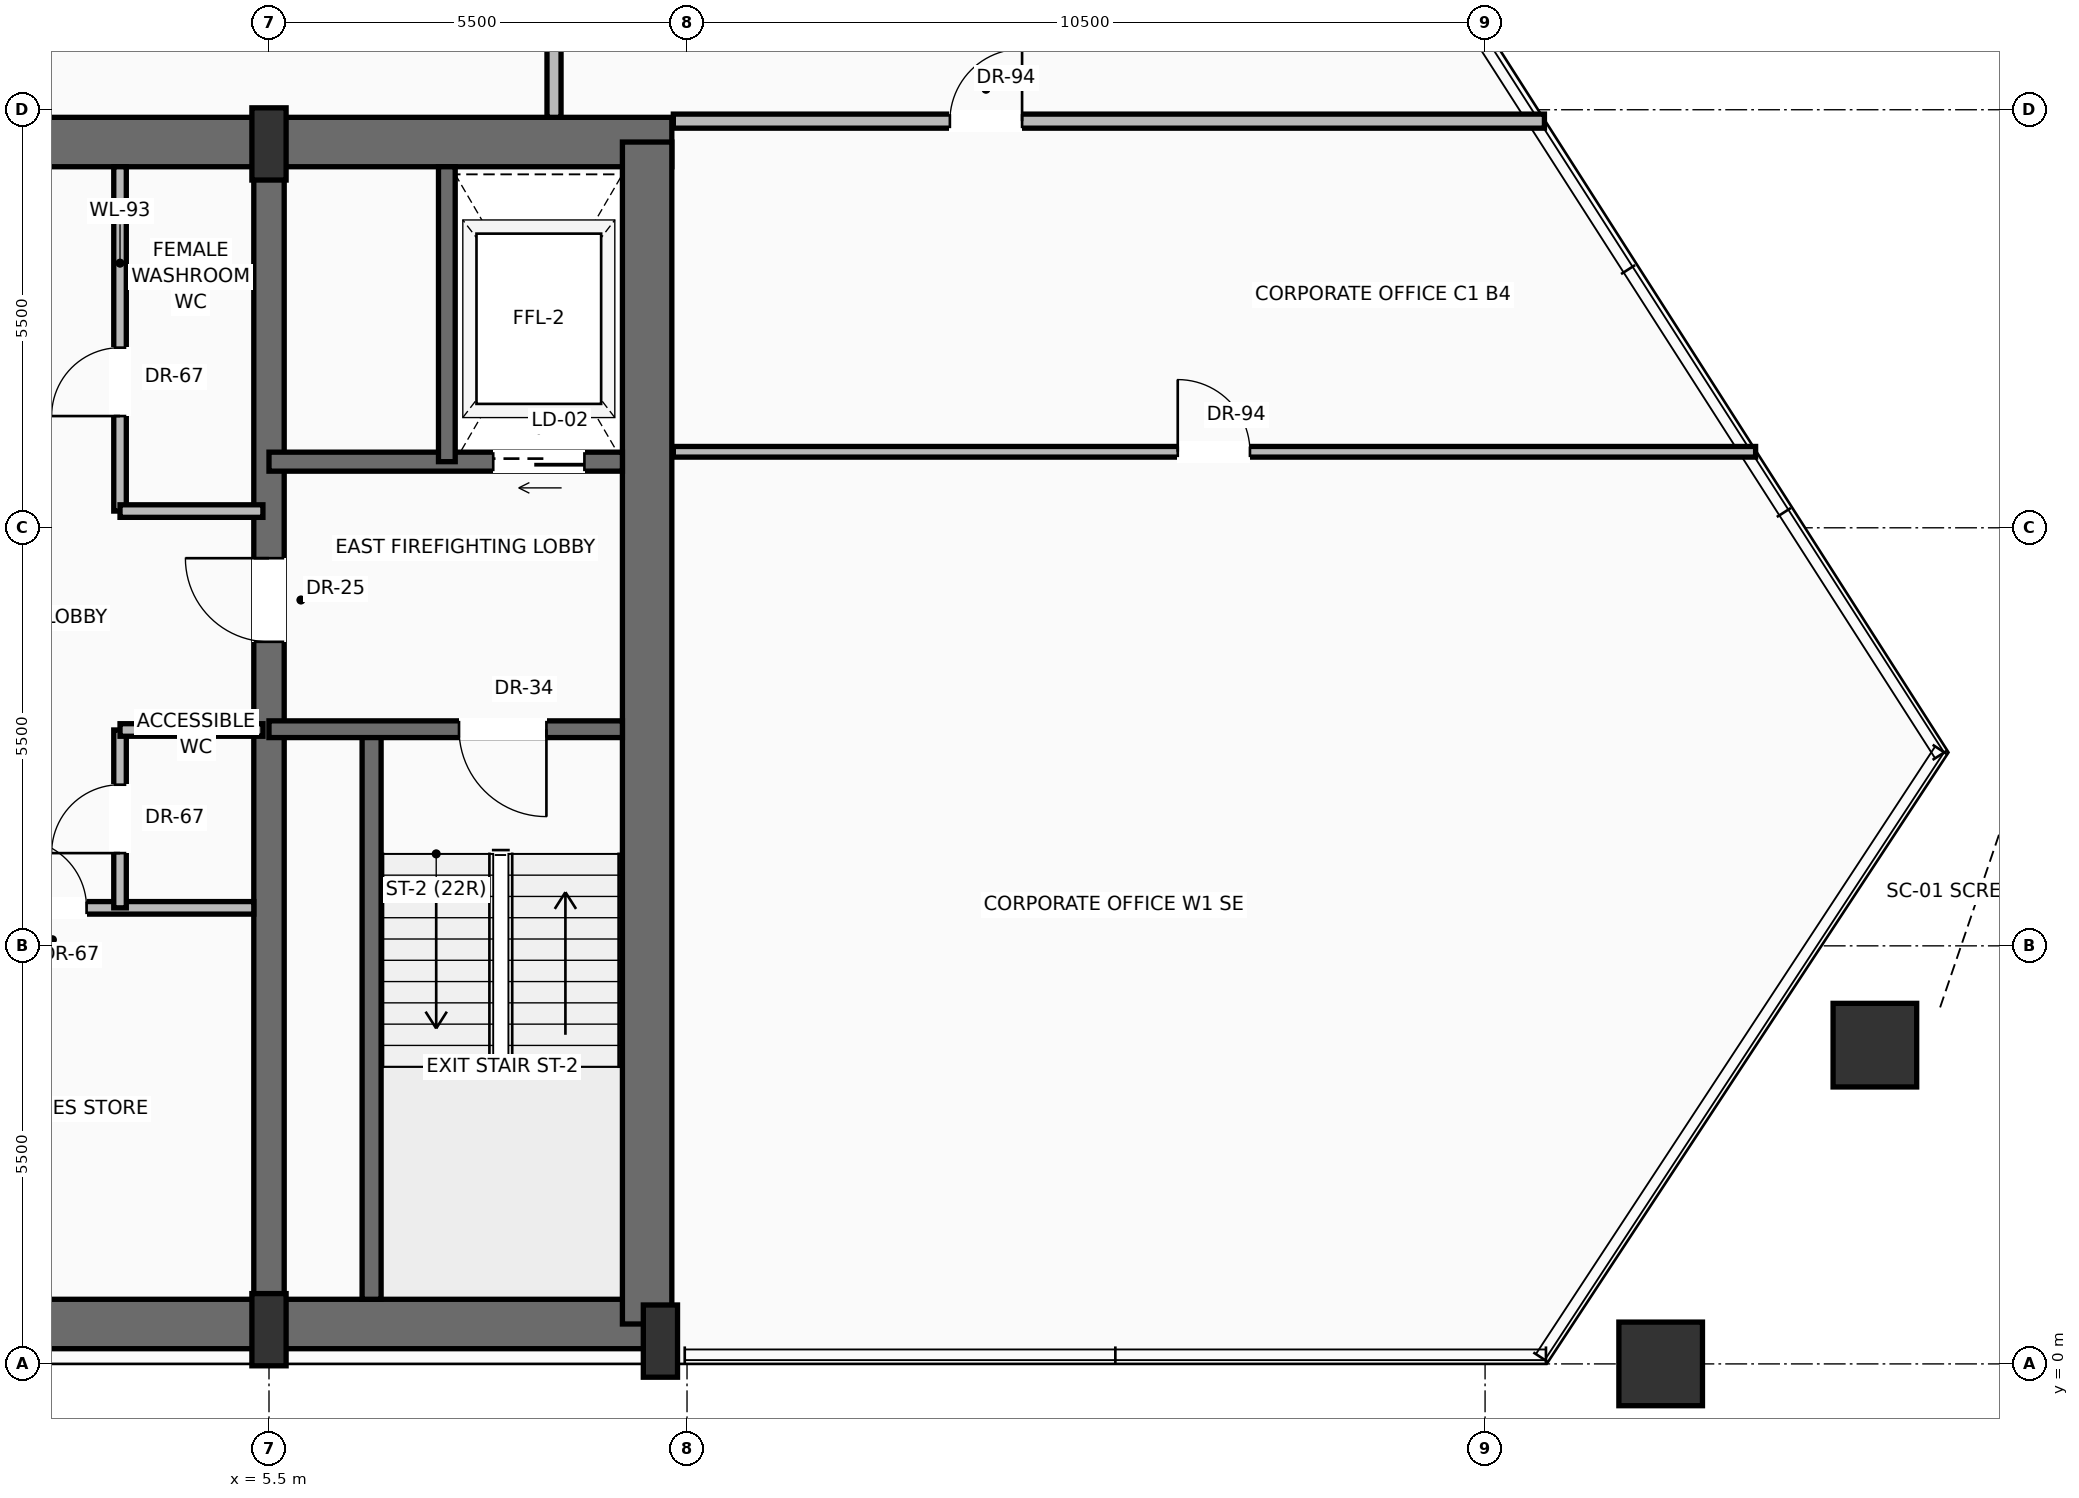
"""IFC4 building model, lengths in metres.
Left out: names, types, materials, properties, quantities, classifications, styles, units other than length and angle.
Written with IfcOpenShell. Run it as: python <this file> out.ifc"""

import sys

from ifc_helpers import new_model, si_unit, direction, frame, frame_2d, origin, origin_2d, place, context, subcontext, project, spatial, rectangle, hollow_rectangle, extrude, source, transform, mapped, element, fill, save


model = new_model("IFC4")
c1 = context("Model", 3, precision=1e-05, world=origin(), true_north=direction((0.0, 1.0)))
c2 = subcontext(c1, "Body", "Model", "MODEL_VIEW")
j1 = project(units=[si_unit("LENGTHUNIT", "METRE"), si_unit("PLANEANGLEUNIT", "RADIAN")], contexts=[c1])
p1 = place(None, origin())
s1 = spatial("IfcSite", under=j1, at=p1, CompositionType="ELEMENT")
p2 = place(p1, origin())
s2 = spatial("IfcBuilding", under=s1, at=p2, CompositionType="ELEMENT")
p3 = place(p2, frame((0.0, 0.0, 129.3)))
s3 = spatial("IfcBuildingStorey", under=s2, at=p3, CompositionType="ELEMENT", Elevation=129.3)
p4 = place(p3, frame((-10.65, 0.525, 0.0), z_axis=(0.0, 0.0, 1.0), x_axis=(1.0, 0.0, 0.0)))
e1 = element("IfcWall", 1, at=p4, inside=s3, PredefinedType="SHEAR", context=c2, shape_type="SweptSolid", body=[
    extrude(rectangle(XDim=21.3, YDim=0.65, at=frame_2d((10.65, 0.0))), origin(), (0.0, 0.0, 1.0), 3.47),
])
p5 = place(p3, frame((-10.8, 16.075, 0.0), z_axis=(0.0, 0.0, 1.0), x_axis=(1.0, 0.0, 0.0)))
e2 = element("IfcWall", 2, at=p5, inside=s3, PredefinedType="SHEAR", context=c2, shape_type="SweptSolid", body=[
    extrude(rectangle(XDim=21.6, YDim=0.65, at=frame_2d((10.8, 0.0))), origin(), (0.0, 0.0, 1.0), 3.47),
])
p6 = place(p5, frame((3.37, 0.0, 0.0)))
e3 = element("IfcOpeningElement", 3, at=p6, cuts=e2, PredefinedType="OPENING", context=c2, shape_type="SweptSolid", body=[
    extrude(rectangle(XDim=1.3, YDim=2.3, at=frame_2d((0.65, 1.15))), frame((0.0, 0.335, 0.0), z_axis=(0.0, -1.0, 0.0), x_axis=(1.0, 0.0, 0.0)), (0.0, 0.0, 1.0), 0.67),
])
p7 = place(p5, frame((9.8, 0.0, 0.0)))
e4 = element("IfcOpeningElement", 4, at=p7, cuts=e2, PredefinedType="OPENING", context=c2, shape_type="SweptSolid", body=[
    extrude(rectangle(XDim=2.0, YDim=2.4, at=frame_2d((1.0, 1.2))), frame((0.0, 0.335, 0.0), z_axis=(0.0, -1.0, 0.0), x_axis=(1.0, 0.0, 0.0)), (0.0, 0.0, 1.0), 0.67),
])
p8 = place(p3, frame((10.475, 0.525, 0.0), z_axis=(0.0, 0.0, 1.0), x_axis=(0.0, 1.0, 0.0)))
e5 = element("IfcWall", 5, at=p8, inside=s3, PredefinedType="SHEAR", context=c2, shape_type="SweptSolid", body=[
    extrude(rectangle(XDim=15.55, YDim=0.65, at=frame_2d((7.775, 0.0))), origin(), (0.0, 0.0, 1.0), 3.47),
])
p9 = place(p3, frame((5.5, 0.525, 0.0), z_axis=(0.0, 0.0, 1.0), x_axis=(0.0, 1.0, 0.0)))
e6 = element("IfcWall", 6, at=p9, inside=s3, PredefinedType="SHEAR", context=c2, shape_type="SweptSolid", body=[
    extrude(rectangle(XDim=15.55, YDim=0.4, at=frame_2d((7.775, 0.0))), origin(), (0.0, 0.0, 1.0), 3.47),
])
p10 = place(p9, frame((8.975, 0.0, 0.0)))
e7 = element("IfcOpeningElement", 7, at=p10, cuts=e6, PredefinedType="OPENING", context=c2, shape_type="SweptSolid", body=[
    extrude(rectangle(XDim=1.1, YDim=2.2, at=frame_2d((0.55, 1.1))), frame((0.0, 0.21, 0.0), z_axis=(0.0, -1.0, 0.0), x_axis=(1.0, 0.0, 0.0)), (0.0, 0.0, 1.0), 0.42),
])
m1 = source(origin(), c2, "Body", "SweptSolid", [
    extrude(rectangle(XDim=0.45, YDim=0.95, at=origin_2d()), origin(), (0.0, 0.0, 1.0), 3.7),
])
for number, where, z_axis, x_axis in (
    (8, (5.5, 0.45, 0.0), (0.0, 0.0, 1.0), (1.0, 0.0, 0.0)),
    (9, (10.65, 0.3, 0.0), (0.0, 0.0, 1.0), (1.0, 0.0, 0.0)),
    (10, (5.5, 16.05, 0.0), (0.0, 0.0, 1.0), (1.0, 0.0, 0.0)),
):
    element("IfcColumn", number, at=place(p3, frame(where, z_axis=z_axis, x_axis=x_axis)), inside=s3, PredefinedType="PILASTER", context=c2, shape_type="MappedRepresentation", body=[
        mapped(m1, transform((0.0, 0.0, 0.0), scale=1.0)),
    ])
m2 = source(origin(), c2, "Body", "SweptSolid", [
    extrude(hollow_rectangle(XDim=1.1, YDim=1.1, WallThickness=0.055, at=origin_2d()), origin(), (0.0, 0.0, 1.0), 3.691),
])
p11 = place(p3, frame((23.81, 0.0, 0.004), z_axis=(0.009590140351, 0.0, 0.999954013547), x_axis=(0.0, 1.0, 0.0)))
e11 = element("IfcColumn", 11, at=p11, inside=s3, PredefinedType="COLUMN", context=c2, shape_type="MappedRepresentation", body=[
    mapped(m2, transform((0.0, 0.0, 0.0), scale=1.0)),
])
m3 = source(origin(), c2, "Body", "SweptSolid", [
    extrude(hollow_rectangle(XDim=1.1, YDim=1.1, WallThickness=0.055, at=origin_2d()), origin(), (0.0, 0.0, 1.0), 3.692),
])
p12 = place(p3, frame((26.629, 4.194, 0.004), z_axis=(-0.003108283928, -0.015475285939, 0.999875419288), x_axis=(0.980419197518, -0.19692180463, 0.0)))
e12 = element("IfcColumn", 12, at=p12, inside=s3, PredefinedType="COLUMN", context=c2, shape_type="MappedRepresentation", body=[
    mapped(m3, transform((0.0, 0.0, 0.0), scale=1.0)),
])
p13 = place(p3, frame((6.85, 0.85, 0.0), z_axis=(0.0, 0.0, 1.0), x_axis=(0.0, 1.0, 0.0)))
e13 = element("IfcWall", 13, at=p13, inside=s3, PredefinedType="SOLIDWALL", context=c2, shape_type="SweptSolid", body=[
    extrude(rectangle(XDim=7.5, YDim=0.25, at=frame_2d((3.75, 0.0))), origin(), (0.0, 0.0, 1.0), 3.47),
])
p14 = place(p3, frame((10.15, 8.35, 0.0), z_axis=(0.0, 0.0, 1.0), x_axis=(-1.0, 0.0, 0.0)))
e14 = element("IfcWall", 14, at=p14, inside=s3, PredefinedType="SOLIDWALL", context=c2, shape_type="SweptSolid", body=[
    extrude(rectangle(XDim=4.65, YDim=0.22, at=frame_2d((2.325, 0.0))), origin(), (0.0, 0.0, 1.0), 3.47),
])
p15 = place(p14, frame((1.0, 0.0, 0.0)))
e15 = element("IfcOpeningElement", 15, at=p15, cuts=e14, PredefinedType="OPENING", context=c2, shape_type="SweptSolid", body=[
    extrude(rectangle(XDim=1.15, YDim=2.2, at=frame_2d((0.575, 1.1))), frame((0.0, 0.12, 0.0), z_axis=(0.0, -1.0, 0.0), x_axis=(1.0, 0.0, 0.0)), (0.0, 0.0, 1.0), 0.24),
])
p16 = place(p3, frame((10.15, 11.87, 0.0), z_axis=(0.0, 0.0, 1.0), x_axis=(-1.0, 0.0, 0.0)))
e16 = element("IfcWall", 16, at=p16, inside=s3, PredefinedType="SOLIDWALL", context=c2, shape_type="SweptSolid", body=[
    extrude(rectangle(XDim=4.65, YDim=0.25, at=frame_2d((2.325, 0.0))), origin(), (0.0, 0.0, 1.0), 3.47),
])
p17 = place(p16, frame((0.5, 0.0, 0.0)))
e17 = element("IfcOpeningElement", 17, at=p17, cuts=e16, PredefinedType="OPENING", context=c2, shape_type="SweptSolid", body=[
    extrude(rectangle(XDim=1.2, YDim=2.25, at=frame_2d((0.6, 1.125))), frame((0.0, 0.135, 0.0), z_axis=(0.0, -1.0, 0.0), x_axis=(1.0, 0.0, 0.0)), (0.0, 0.0, 1.0), 0.27),
])
p18 = place(p3, frame((7.84, 11.87, 0.0), z_axis=(0.0, 0.0, 1.0), x_axis=(0.0, 1.0, 0.0)))
e18 = element("IfcWall", 18, at=p18, inside=s3, PredefinedType="SOLIDWALL", context=c2, shape_type="SweptSolid", body=[
    extrude(rectangle(XDim=3.88, YDim=0.22, at=frame_2d((1.94, 0.0))), origin(), (0.0, 0.0, 1.0), 3.47),
])
p19 = place(p3, frame((1.82, 6.0, 0.0), z_axis=(0.0, 0.0, 1.0), x_axis=(1.0, 0.0, 0.0)))
e19 = element("IfcWall", 19, at=p19, inside=s3, PredefinedType="PARTITIONING", context=c2, shape_type="SweptSolid", body=[
    extrude(rectangle(XDim=3.48, YDim=0.165, at=frame_2d((1.74, 0.0))), origin(), (0.0, 0.0, 1.0), 3.462),
])
p20 = place(p19, frame((0.38, 0.0, 0.0)))
e20 = element("IfcOpeningElement", 20, at=p20, cuts=e19, PredefinedType="OPENING", context=c2, shape_type="SweptSolid", body=[
    extrude(rectangle(XDim=0.9, YDim=2.1, at=frame_2d((0.45, 1.05))), frame((0.0, 0.093, 0.0), z_axis=(0.0, -1.0, 0.0), x_axis=(1.0, 0.0, 0.0)), (0.0, 0.0, 1.0), 0.185),
])
p21 = place(p3, frame((3.54, 6.0, 0.0), z_axis=(0.0, 0.0, 1.0), x_axis=(0.0, 1.0, 0.0)))
e21 = element("IfcWall", 21, at=p21, inside=s3, PredefinedType="PARTITIONING", context=c2, shape_type="SweptSolid", body=[
    extrude(rectangle(XDim=2.34, YDim=0.165, at=frame_2d((1.17, 0.0))), origin(), (0.0, 0.0, 1.0), 3.462),
])
p22 = place(p21, frame((0.72, 0.0, 0.0)))
e22 = element("IfcOpeningElement", 22, at=p22, cuts=e21, PredefinedType="OPENING", context=c2, shape_type="SweptSolid", body=[
    extrude(rectangle(XDim=0.9, YDim=2.1, at=frame_2d((0.45, 1.05))), frame((0.0, 0.093, 0.0), z_axis=(0.0, -1.0, 0.0), x_axis=(1.0, 0.0, 0.0)), (0.0, 0.0, 1.0), 0.185),
])
p23 = place(p3, frame((3.54, 8.34, 0.0), z_axis=(0.0, 0.0, 1.0), x_axis=(1.0, 0.0, 0.0)))
e23 = element("IfcWall", 23, at=p23, inside=s3, PredefinedType="PARTITIONING", context=c2, shape_type="SweptSolid", body=[
    extrude(rectangle(XDim=1.88, YDim=0.165, at=frame_2d((0.94, 0.0))), origin(), (0.0, 0.0, 1.0), 3.462),
])
p24 = place(p3, frame((3.54, 11.22, 0.0), z_axis=(0.0, 0.0, 1.0), x_axis=(0.0, 1.0, 0.0)))
e24 = element("IfcWall", 24, at=p24, inside=s3, PredefinedType="PARTITIONING", context=c2, shape_type="SweptSolid", body=[
    extrude(rectangle(XDim=4.53, YDim=0.165, at=frame_2d((2.265, 0.0))), origin(), (0.0, 0.0, 1.0), 3.462),
])
p25 = place(p24, frame((1.25, 0.0, 0.0)))
e25 = element("IfcOpeningElement", 25, at=p25, cuts=e24, PredefinedType="OPENING", context=c2, shape_type="SweptSolid", body=[
    extrude(rectangle(XDim=0.9, YDim=2.1, at=frame_2d((0.45, 1.05))), frame((0.0, 0.093, 0.0), z_axis=(0.0, -1.0, 0.0), x_axis=(1.0, 0.0, 0.0)), (0.0, 0.0, 1.0), 0.185),
])
p26 = place(p3, frame((3.54, 11.22, 0.0), z_axis=(0.0, 0.0, 1.0), x_axis=(1.0, 0.0, 0.0)))
e26 = element("IfcWall", 26, at=p26, inside=s3, PredefinedType="PARTITIONING", context=c2, shape_type="SweptSolid", body=[
    extrude(rectangle(XDim=1.88, YDim=0.165, at=frame_2d((0.94, 0.0))), origin(), (0.0, 0.0, 1.0), 3.462),
])
p27 = place(p3, frame((9.25, 16.4, 0.0), z_axis=(0.0, 0.0, 1.0), x_axis=(0.0, 1.0, 0.0)))
e27 = element("IfcWall", 27, at=p27, inside=s3, PredefinedType="PARTITIONING", context=c2, shape_type="SweptSolid", body=[
    extrude(rectangle(XDim=9.0, YDim=0.185, at=frame_2d((4.5, 0.0))), origin(), (0.0, 0.0, 1.0), 2.846),
])
p28 = place(p27, frame((4.441, 0.0, 0.0)))
e28 = element("IfcOpeningElement", 28, at=p28, cuts=e27, PredefinedType="OPENING", context=c2, shape_type="SweptSolid", body=[
    extrude(rectangle(XDim=0.95, YDim=2.2, at=frame_2d((0.475, 1.1))), frame((0.0, 0.103, 0.0), z_axis=(0.0, -1.0, 0.0), x_axis=(1.0, 0.0, 0.0)), (0.0, 0.0, 1.0), 0.205),
])
p29 = place(p3, frame((10.82, 16.35, 0.0), z_axis=(0.0, 0.0, 1.0), x_axis=(1.0, 0.0, 0.0)))
e29 = element("IfcWall", 29, at=p29, inside=s3, PredefinedType="PARTITIONING", context=c2, shape_type="SweptSolid", body=[
    extrude(rectangle(XDim=11.461, YDim=0.185, at=frame_2d((5.73, 0.0))), origin(), (0.0, 0.0, 1.0), 3.462),
])
p30 = place(p29, frame((3.638, 0.0, 0.0)))
e30 = element("IfcOpeningElement", 30, at=p30, cuts=e29, PredefinedType="OPENING", context=c2, shape_type="SweptSolid", body=[
    extrude(rectangle(XDim=0.95, YDim=2.2, at=frame_2d((0.475, 1.1))), frame((0.0, 0.103, 0.0), z_axis=(0.0, -1.0, 0.0), x_axis=(1.0, 0.0, 0.0)), (0.0, 0.0, 1.0), 0.205),
])
p31 = place(p3, frame((10.82, 12.0, 0.0), z_axis=(0.0, 0.0, 1.0), x_axis=(1.0, 0.0, 0.0)))
e31 = element("IfcWall", 31, at=p31, inside=s3, PredefinedType="PARTITIONING", context=c2, shape_type="SweptSolid", body=[
    extrude(rectangle(XDim=14.239, YDim=0.14, at=frame_2d((7.12, 0.0))), origin(), (0.0, 0.0, 1.0), 3.462),
])
p32 = place(p31, frame((6.636, 0.0, 0.0)))
e32 = element("IfcOpeningElement", 32, at=p32, cuts=e31, PredefinedType="OPENING", context=c2, shape_type="SweptSolid", body=[
    extrude(rectangle(XDim=0.95, YDim=2.2, at=frame_2d((0.475, 1.1))), frame((0.0, 0.08, 0.0), z_axis=(0.0, -1.0, 0.0), x_axis=(1.0, 0.0, 0.0)), (0.0, 0.0, 1.0), 0.16),
])
m4 = source(origin(), c2, "Body", "SweptSolid", [
    extrude(rectangle(XDim=1.15, YDim=2.2, at=frame_2d((0.575, 1.1))), frame((0.0, 0.025, 0.0), z_axis=(0.0, -1.0, 0.0), x_axis=(1.0, 0.0, 0.0)), (0.0, 0.0, 1.0), 0.05),
])
p33 = place(p15, origin())
e33 = element("IfcDoor", 33, at=p33, inside=s3, OperationType="SINGLE_SWING_LEFT", PredefinedType="DOOR", context=c2, shape_type="MappedRepresentation", body=[
    mapped(m4, transform((0.0, 0.0, 0.0), scale=1.0)),
])
fill(e15, e33)
m5 = source(origin(), c2, "Body", "SweptSolid", [
    extrude(rectangle(XDim=1.1, YDim=2.2, at=frame_2d((0.55, 1.1))), frame((0.0, 0.025, 0.0), z_axis=(0.0, -1.0, 0.0), x_axis=(1.0, 0.0, 0.0)), (0.0, 0.0, 1.0), 0.05),
])
p34 = place(p10, origin())
e34 = element("IfcDoor", 34, at=p34, inside=s3, OperationType="SINGLE_SWING_RIGHT", PredefinedType="DOOR", context=c2, shape_type="MappedRepresentation", body=[
    mapped(m5, transform((0.0, 0.0, 0.0), scale=1.0)),
])
fill(e7, e34)
m6 = source(origin(), c2, "Body", "SweptSolid", [
    extrude(rectangle(XDim=1.2, YDim=2.25, at=frame_2d((0.6, 1.125))), frame((0.0, 0.025, 0.0), z_axis=(0.0, -1.0, 0.0), x_axis=(1.0, 0.0, 0.0)), (0.0, 0.0, 1.0), 0.05),
])
p35 = place(p17, origin())
e35 = element("IfcDoor", 35, at=p35, inside=s3, OperationType="SLIDING_TO_RIGHT", PredefinedType="DOOR", context=c2, shape_type="MappedRepresentation", body=[
    mapped(m6, transform((0.0, 0.0, 0.0), scale=1.0)),
])
fill(e17, e35)
m7 = source(origin(), c2, "Body", "SweptSolid", [
    extrude(rectangle(XDim=0.9, YDim=2.1, at=frame_2d((0.45, 1.05))), frame((0.0, 0.025, 0.0), z_axis=(0.0, -1.0, 0.0), x_axis=(1.0, 0.0, 0.0)), (0.0, 0.0, 1.0), 0.05),
])
p36 = place(p20, origin())
e36 = element("IfcDoor", 36, at=p36, inside=s3, OperationType="SINGLE_SWING_LEFT", PredefinedType="DOOR", context=c2, shape_type="MappedRepresentation", body=[
    mapped(m7, transform((0.0, 0.0, 0.0), scale=1.0)),
])
fill(e20, e36)
p37 = place(p22, origin())
e37 = element("IfcDoor", 37, at=p37, inside=s3, OperationType="SINGLE_SWING_LEFT", PredefinedType="DOOR", context=c2, shape_type="MappedRepresentation", body=[
    mapped(m7, transform((0.0, 0.0, 0.0), scale=1.0)),
])
fill(e22, e37)
p38 = place(p25, origin())
e38 = element("IfcDoor", 38, at=p38, inside=s3, OperationType="SINGLE_SWING_LEFT", PredefinedType="DOOR", context=c2, shape_type="MappedRepresentation", body=[
    mapped(m7, transform((0.0, 0.0, 0.0), scale=1.0)),
])
fill(e25, e38)
m8 = source(origin(), c2, "Body", "SweptSolid", [
    extrude(rectangle(XDim=0.95, YDim=2.2, at=frame_2d((0.475, 1.1))), frame((0.0, 0.025, 0.0), z_axis=(0.0, -1.0, 0.0), x_axis=(1.0, 0.0, 0.0)), (0.0, 0.0, 1.0), 0.05),
])
p39 = place(p30, origin())
e39 = element("IfcDoor", 39, at=p39, inside=s3, OperationType="SINGLE_SWING_RIGHT", PredefinedType="DOOR", context=c2, shape_type="MappedRepresentation", body=[
    mapped(m8, transform((0.0, 0.0, 0.0), scale=1.0)),
])
fill(e30, e39)
p40 = place(p32, origin())
e40 = element("IfcDoor", 40, at=p40, inside=s3, OperationType="SINGLE_SWING_LEFT", PredefinedType="DOOR", context=c2, shape_type="MappedRepresentation", body=[
    mapped(m8, transform((0.0, 0.0, 0.0), scale=1.0)),
])
fill(e32, e40)
save(model, sys.argv[1])
